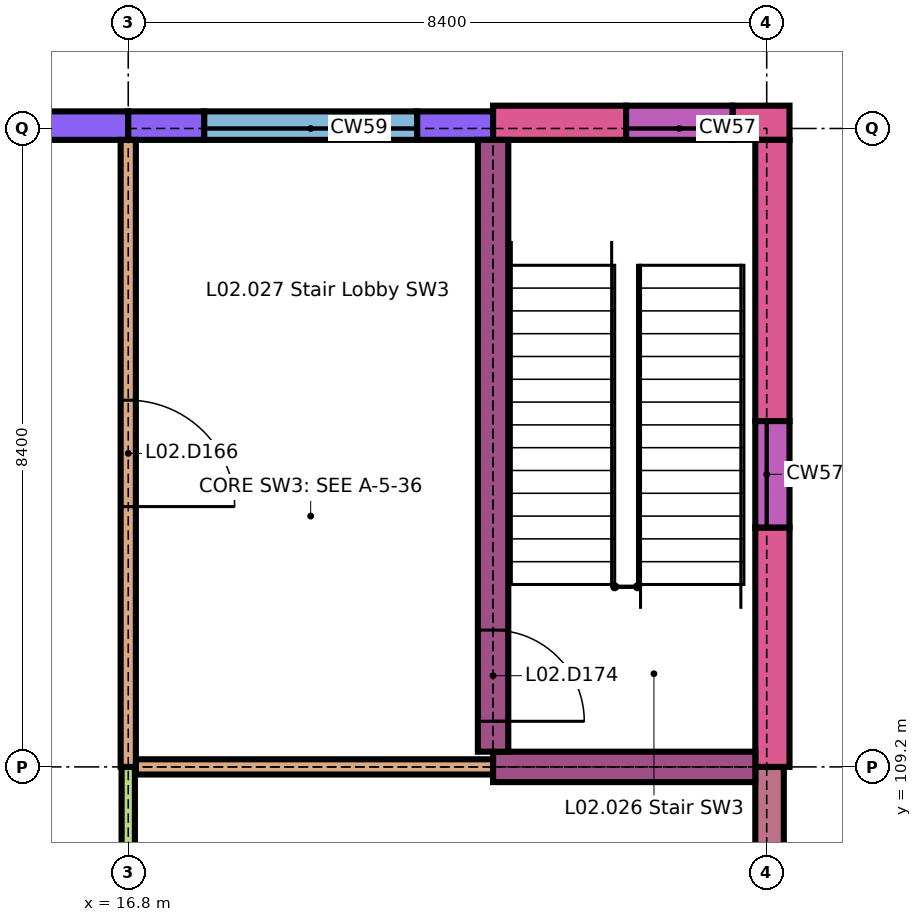
"""IFC4 building model, lengths in metres.
Left out: names, types, materials, properties, quantities, classifications, styles, units other than length and angle.
Written with IfcOpenShell. Run it as: python <this file> out.ifc"""

import sys

from ifc_helpers import new_model, si_unit, direction, frame, frame_2d, origin, place, context, subcontext, project, spatial, rectangle, extrude, element, fill, save


model = new_model("IFC4")
c1 = context("Model", 3, precision=1e-05, world=origin(), true_north=direction((0.0, 1.0)))
c2 = subcontext(c1, "Body", "Model", "MODEL_VIEW")
j1 = project(units=[si_unit("LENGTHUNIT", "METRE"), si_unit("PLANEANGLEUNIT", "RADIAN")], contexts=[c1])
p1 = place(None, origin())
s1 = spatial("IfcSite", under=j1, at=p1, CompositionType="ELEMENT")
p2 = place(p1, origin())
s2 = spatial("IfcBuilding", under=s1, at=p2, CompositionType="ELEMENT")
p3 = place(p2, frame((0.0, 0.0, 8.4)))
s3 = spatial("IfcBuildingStorey", under=s2, at=p3, CompositionType="ELEMENT", Elevation=8.4)
p4 = place(p3, frame((13.8, 117.637, 0.0), z_axis=(0.0, 0.0, 1.0), x_axis=(1.0, 0.0, 0.0)))
e1 = element("IfcWall", 1, at=p4, inside=s3, PredefinedType="SOLIDWALL", context=c2, shape_type="SweptSolid", body=[
    extrude(rectangle(XDim=3.0, YDim=0.375, at=frame_2d((1.5, 0.0))), origin(), (0.0, 0.0, 1.0), 4.2),
])
p5 = place(p4, frame((0.45, 0.0, 0.9)))
e2 = element("IfcOpeningElement", 2, at=p5, cuts=e1, PredefinedType="OPENING", context=c2, shape_type="SweptSolid", body=[
    extrude(rectangle(XDim=0.9, YDim=2.1, at=frame_2d((0.45, 1.05))), frame((0.0, 0.198, 0.0), z_axis=(0.0, -1.0, 0.0), x_axis=(1.0, 0.0, 0.0)), (0.0, 0.0, 1.0), 0.395),
])
for number, where, z_axis, x_axis in (
    (3, (16.8, 117.637, 0.0), (0.0, 0.0, 1.0), (1.0, 0.0, 0.0)),
    (4, (20.6, 117.637, 0.0), (0.0, 0.0, 1.0), (1.0, 0.0, 0.0)),
):
    element("IfcWall", number, at=place(p3, frame(where, z_axis=z_axis, x_axis=x_axis)), inside=s3, PredefinedType="SOLIDWALL", context=c2, shape_type="SweptSolid", body=[
        extrude(rectangle(XDim=1.0, YDim=0.375, at=frame_2d((0.5, 0.0))), origin(), (0.0, 0.0, 1.0), 4.2),
    ])
p6 = place(p3, frame((17.8, 117.637, 0.0), z_axis=(0.0, 0.0, 1.0), x_axis=(1.0, 0.0, 0.0)))
e5 = element("IfcWall", 5, at=p6, inside=s3, PredefinedType="SOLIDWALL", context=c2, shape_type="SweptSolid", body=[
    extrude(rectangle(XDim=2.8, YDim=0.375, at=frame_2d((1.4, 0.0))), origin(), (0.0, 0.0, 1.0), 0.6),
])
p7 = place(p3, frame((21.6, 117.675, 0.0), z_axis=(0.0, 0.0, 1.0), x_axis=(1.0, 0.0, 0.0)))
e6 = element("IfcWall", 6, at=p7, inside=s3, PredefinedType="SOLIDWALL", context=c2, shape_type="SweptSolid", body=[
    extrude(rectangle(XDim=1.75, YDim=0.45, at=frame_2d((0.875, 0.0))), origin(), (0.0, 0.0, 1.0), 4.2),
])
p8 = place(p3, frame((24.75, 117.675, 0.0), z_axis=(0.0, 0.0, 1.0), x_axis=(1.0, 0.0, 0.0)))
e7 = element("IfcWall", 7, at=p8, inside=s3, PredefinedType="SOLIDWALL", context=c2, shape_type="SweptSolid", body=[
    extrude(rectangle(XDim=0.75, YDim=0.45, at=frame_2d((0.375, 0.0))), origin(), (0.0, 0.0, 1.0), 4.2),
])
p9 = place(p3, frame((23.35, 117.675, 0.0), z_axis=(0.0, 0.0, 1.0), x_axis=(1.0, 0.0, 0.0)))
e8 = element("IfcWall", 8, at=p9, inside=s3, PredefinedType="SOLIDWALL", context=c2, shape_type="SweptSolid", body=[
    extrude(rectangle(XDim=1.4, YDim=0.45, at=frame_2d((0.7, 0.0))), origin(), (0.0, 0.0, 1.0), 0.6),
])
p10 = place(p3, frame((25.238, 105.0, 0.0), z_axis=(0.0, 0.0, 1.0), x_axis=(0.0, 1.0, 0.0)))
e9 = element("IfcWall", 9, at=p10, inside=s3, PredefinedType="SOLIDWALL", context=c2, shape_type="SweptSolid", body=[
    extrude(rectangle(XDim=4.2, YDim=0.375, at=frame_2d((2.1, 0.0))), origin(), (0.0, 0.0, 1.0), 3.9),
])
p11 = place(p10, frame((1.05, 0.0, 0.9)))
e10 = element("IfcOpeningElement", 10, at=p11, cuts=e9, PredefinedType="OPENING", context=c2, shape_type="SweptSolid", body=[
    extrude(rectangle(XDim=2.1, YDim=2.1, at=frame_2d((1.05, 1.05))), frame((0.0, 0.198, 0.0), z_axis=(0.0, -1.0, 0.0), x_axis=(1.0, 0.0, 0.0)), (0.0, 0.0, 1.0), 0.395),
])
p12 = place(p3, frame((25.275, 109.2, 0.0), z_axis=(0.0, 0.0, 1.0), x_axis=(0.0, 1.0, 0.0)))
e11 = element("IfcWall", 11, at=p12, inside=s3, PredefinedType="SOLIDWALL", context=c2, shape_type="SweptSolid", body=[
    extrude(rectangle(XDim=3.15, YDim=0.45, at=frame_2d((1.575, 0.0))), origin(), (0.0, 0.0, 1.0), 4.2),
])
p13 = place(p3, frame((25.275, 113.75, 0.0), z_axis=(0.0, 0.0, 1.0), x_axis=(0.0, 1.0, 0.0)))
e12 = element("IfcWall", 12, at=p13, inside=s3, PredefinedType="SOLIDWALL", context=c2, shape_type="SweptSolid", body=[
    extrude(rectangle(XDim=3.7, YDim=0.45, at=frame_2d((1.85, 0.0))), origin(), (0.0, 0.0, 1.0), 4.2),
])
p14 = place(p3, frame((25.275, 112.35, 0.0), z_axis=(0.0, 0.0, 1.0), x_axis=(0.0, 1.0, 0.0)))
e13 = element("IfcWall", 13, at=p14, inside=s3, PredefinedType="SOLIDWALL", context=c2, shape_type="SweptSolid", body=[
    extrude(rectangle(XDim=1.4, YDim=0.45, at=frame_2d((0.7, 0.0))), origin(), (0.0, 0.0, 1.0), 0.6),
])
p15 = place(p3, frame((16.9, 109.2, 0.0), z_axis=(0.0, 0.0, 1.0), x_axis=(1.0, 0.0, 0.0)))
e14 = element("IfcWall", 14, at=p15, inside=s3, PredefinedType="PARTITIONING", context=c2, shape_type="SweptSolid", body=[
    extrude(rectangle(XDim=4.7, YDim=0.2, at=frame_2d((2.35, 0.0))), origin(), (0.0, 0.0, 1.0), 4.2),
])
p16 = place(p3, frame((21.6, 109.2, 0.0), z_axis=(0.0, 0.0, 1.0), x_axis=(1.0, 0.0, 0.0)))
e15 = element("IfcWall", 15, at=p16, inside=s3, PredefinedType="SHEAR", context=c2, shape_type="SweptSolid", body=[
    extrude(rectangle(XDim=3.45, YDim=0.4, at=frame_2d((1.725, 0.0))), origin(), (0.0, 0.0, 1.0), 4.2),
])
p17 = place(p3, frame((16.8, 105.0, 0.0), z_axis=(0.0, 0.0, 1.0), x_axis=(0.0, 1.0, 0.0)))
e16 = element("IfcWall", 16, at=p17, inside=s3, PredefinedType="PARTITIONING", context=c2, shape_type="SweptSolid", body=[
    extrude(rectangle(XDim=4.2, YDim=0.175, at=frame_2d((2.1, 0.0))), origin(), (0.0, 0.0, 1.0), 4.2),
])
p18 = place(p17, frame((1.55, 0.0, 0.0)))
e17 = element("IfcOpeningElement", 17, at=p18, cuts=e16, PredefinedType="OPENING", context=c2, shape_type="SweptSolid", body=[
    extrude(rectangle(XDim=1.1, YDim=2.1, at=frame_2d((0.55, 1.05))), frame((0.0, 0.097, 0.0), z_axis=(0.0, -1.0, 0.0), x_axis=(1.0, 0.0, 0.0)), (0.0, 0.0, 1.0), 0.195),
])
p19 = place(p3, frame((16.8, 109.2, 0.0), z_axis=(0.0, 0.0, 1.0), x_axis=(0.0, 1.0, 0.0)))
e18 = element("IfcWall", 18, at=p19, inside=s3, PredefinedType="PARTITIONING", context=c2, shape_type="SweptSolid", body=[
    extrude(rectangle(XDim=8.25, YDim=0.2, at=frame_2d((4.125, 0.0))), origin(), (0.0, 0.0, 1.0), 4.2),
])
p20 = place(p19, frame((3.425, 0.0, 0.0)))
e19 = element("IfcOpeningElement", 19, at=p20, cuts=e18, PredefinedType="OPENING", context=c2, shape_type="SweptSolid", body=[
    extrude(rectangle(XDim=1.4, YDim=2.1, at=frame_2d((0.7, 1.05))), frame((0.0, 0.11, 0.0), z_axis=(0.0, -1.0, 0.0), x_axis=(1.0, 0.0, 0.0)), (0.0, 0.0, 1.0), 0.22),
])
p21 = place(p3, frame((21.6, 109.4, 0.0), z_axis=(0.0, 0.0, 1.0), x_axis=(0.0, 1.0, 0.0)))
e20 = element("IfcWall", 20, at=p21, inside=s3, PredefinedType="SHEAR", context=c2, shape_type="SweptSolid", body=[
    extrude(rectangle(XDim=8.05, YDim=0.4, at=frame_2d((4.025, 0.0))), origin(), (0.0, 0.0, 1.0), 4.2),
])
p22 = place(p21, frame((0.4, 0.0, 0.0)))
e21 = element("IfcOpeningElement", 21, at=p22, cuts=e20, PredefinedType="OPENING", context=c2, shape_type="SweptSolid", body=[
    extrude(rectangle(XDim=1.2, YDim=2.1, at=frame_2d((0.6, 1.05))), frame((0.0, 0.21, 0.0), z_axis=(0.0, -1.0, 0.0), x_axis=(1.0, 0.0, 0.0)), (0.0, 0.0, 1.0), 0.42),
])
p23 = place(p20, origin())
e22 = element("IfcDoor", 22, at=p23, inside=s3, OperationType="SINGLE_SWING_LEFT", PredefinedType="DOOR", context=c2, shape_type="SweptSolid", body=[
    extrude(rectangle(XDim=1.4, YDim=2.1, at=frame_2d((0.7, 1.05))), frame((0.0, 0.03, 0.0), z_axis=(0.0, -1.0, 0.0), x_axis=(1.0, 0.0, 0.0)), (0.0, 0.0, 1.0), 0.06),
])
fill(e19, e22)
p24 = place(p22, origin())
e23 = element("IfcDoor", 23, at=p24, inside=s3, OperationType="SINGLE_SWING_LEFT", PredefinedType="DOOR", context=c2, shape_type="SweptSolid", body=[
    extrude(rectangle(XDim=1.2, YDim=2.1, at=frame_2d((0.6, 1.05))), frame((0.0, 0.025, 0.0), z_axis=(0.0, -1.0, 0.0), x_axis=(1.0, 0.0, 0.0)), (0.0, 0.0, 1.0), 0.05),
])
fill(e21, e23)
save(model, sys.argv[1])
